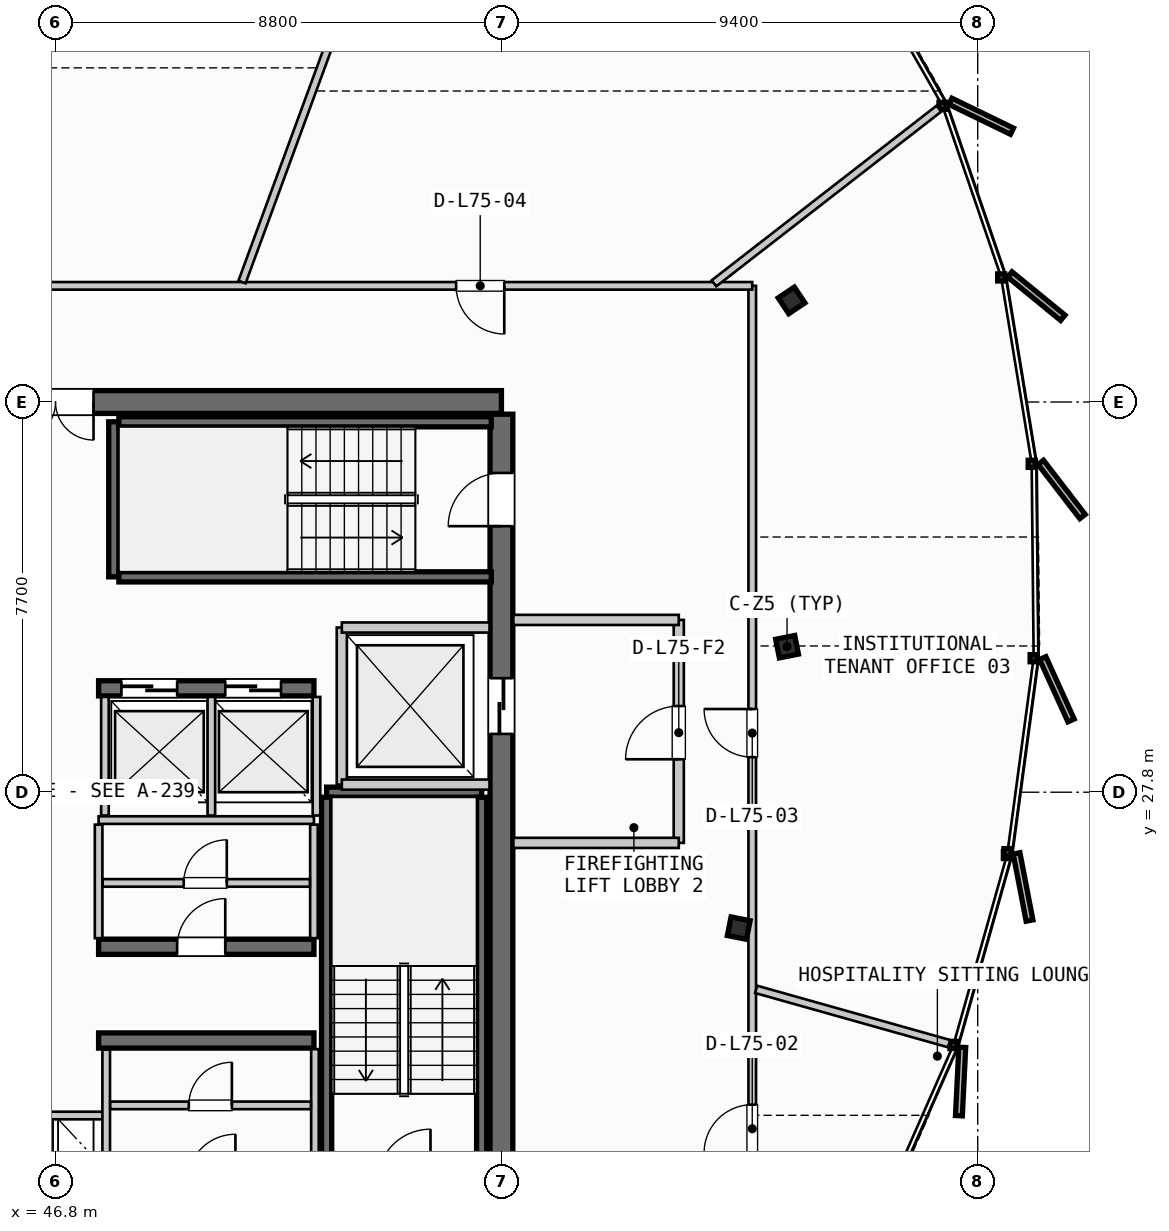
"""IFC4 building model, lengths in metres.
Left out: names, types, materials, properties, quantities, classifications, styles, units other than length and angle.
Written with IfcOpenShell. Run it as: python <this file> out.ifc"""

import sys

from ifc_helpers import new_model, si_unit, direction, frame, frame_2d, origin, origin_2d, place, context, subcontext, project, spatial, rectangle, i_section, extrude, source, transform, mapped, element, fill, save


model = new_model("IFC4")
c1 = context("Model", 3, precision=1e-05, world=origin(), true_north=direction((0.0, 1.0)))
c2 = subcontext(c1, "Body", "Model", "MODEL_VIEW")
j1 = project(units=[si_unit("LENGTHUNIT", "METRE"), si_unit("PLANEANGLEUNIT", "RADIAN")], contexts=[c1])
p1 = place(None, origin())
s1 = spatial("IfcSite", under=j1, at=p1, CompositionType="ELEMENT")
p2 = place(p1, origin())
s2 = spatial("IfcBuilding", under=s1, at=p2, CompositionType="ELEMENT")
p3 = place(p2, frame((0.0, 0.0, 283.6)))
s3 = spatial("IfcBuildingStorey", under=s2, at=p3, CompositionType="ELEMENT", Elevation=283.6)
p4 = place(p3, frame((55.6, 35.5, 0.0), z_axis=(0.0, 0.0, 1.0), x_axis=(-1.0, 0.0, 0.0)))
e1 = element("IfcWall", 1, at=p4, inside=s3, PredefinedType="SHEAR", context=c2, shape_type="SweptSolid", body=[
    extrude(rectangle(XDim=17.6, YDim=0.45, at=frame_2d((8.8, 0.0))), origin(), (0.0, 0.0, 1.0), 3.21),
])
p5 = place(p4, frame((8.05, 0.0, 0.0)))
e2 = element("IfcOpeningElement", 2, at=p5, cuts=e1, PredefinedType="OPENING", context=c2, shape_type="SweptSolid", body=[
    extrude(rectangle(XDim=1.5, YDim=2.2, at=frame_2d((0.75, 1.1))), frame((0.0, 0.235, 0.0), z_axis=(0.0, -1.0, 0.0), x_axis=(1.0, 0.0, 0.0)), (0.0, 0.0, 1.0), 0.47),
])
p6 = place(p4, frame((15.1, 0.0, 0.0)))
e3 = element("IfcOpeningElement", 3, at=p6, cuts=e1, PredefinedType="OPENING", context=c2, shape_type="SweptSolid", body=[
    extrude(rectangle(XDim=0.95, YDim=2.15, at=frame_2d((0.475, 1.075))), frame((0.0, 0.235, 0.0), z_axis=(0.0, -1.0, 0.0), x_axis=(1.0, 0.0, 0.0)), (0.0, 0.0, 1.0), 0.47),
])
p7 = place(p4, frame((12.9, 0.0, 0.0)))
e4 = element("IfcOpeningElement", 4, at=p7, cuts=e1, PredefinedType="OPENING", context=c2, shape_type="SweptSolid", body=[
    extrude(rectangle(XDim=0.9, YDim=2.15, at=frame_2d((0.45, 1.075))), frame((0.0, 0.235, 0.0), z_axis=(0.0, -1.0, 0.0), x_axis=(1.0, 0.0, 0.0)), (0.0, 0.0, 1.0), 0.47),
])
p8 = place(p4, frame((10.6, 0.0, 0.0)))
e5 = element("IfcOpeningElement", 5, at=p8, cuts=e1, PredefinedType="OPENING", context=c2, shape_type="SweptSolid", body=[
    extrude(rectangle(XDim=0.95, YDim=2.15, at=frame_2d((0.475, 1.075))), frame((0.0, 0.235, 0.0), z_axis=(0.0, -1.0, 0.0), x_axis=(1.0, 0.0, 0.0)), (0.0, 0.0, 1.0), 0.47),
])
p9 = place(p3, frame((55.6, 20.34, 0.0), z_axis=(0.0, 0.0, 1.0), x_axis=(0.0, 1.0, 0.0)))
e6 = element("IfcWall", 6, at=p9, inside=s3, PredefinedType="SHEAR", context=c2, shape_type="SweptSolid", body=[
    extrude(rectangle(XDim=14.92, YDim=0.45, at=frame_2d((7.46, 0.0))), origin(), (0.0, 0.0, 1.0), 3.21),
])
p10 = place(p9, frame((12.71, 0.0, 0.0)))
e7 = element("IfcOpeningElement", 7, at=p10, cuts=e6, PredefinedType="OPENING", context=c2, shape_type="SweptSolid", body=[
    extrude(rectangle(XDim=1.05, YDim=2.15, at=frame_2d((0.525, 1.075))), frame((0.0, 0.235, 0.0), z_axis=(0.0, -1.0, 0.0), x_axis=(1.0, 0.0, 0.0)), (0.0, 0.0, 1.0), 0.47),
])
p11 = place(p9, frame((8.61, 0.0, 0.0)))
e8 = element("IfcOpeningElement", 8, at=p11, cuts=e6, PredefinedType="OPENING", context=c2, shape_type="SweptSolid", body=[
    extrude(rectangle(XDim=1.1, YDim=2.2, at=frame_2d((0.55, 1.1))), frame((0.0, 0.235, 0.0), z_axis=(0.0, -1.0, 0.0), x_axis=(1.0, 0.0, 0.0)), (0.0, 0.0, 1.0), 0.47),
])
p12 = place(p3, frame((47.65, 22.9, 0.0), z_axis=(0.0, 0.0, 1.0), x_axis=(1.0, 0.0, 0.0)))
e9 = element("IfcWall", 9, at=p12, inside=s3, PredefinedType="SHEAR", context=c2, shape_type="SweptSolid", body=[
    extrude(rectangle(XDim=4.25, YDim=0.3, at=frame_2d((2.125, 0.0))), origin(), (0.0, 0.0, 1.0), 3.21),
])
p13 = place(p3, frame((47.65, 24.75, 0.0), z_axis=(0.0, 0.0, 1.0), x_axis=(1.0, 0.0, 0.0)))
e10 = element("IfcWall", 10, at=p13, inside=s3, PredefinedType="SHEAR", context=c2, shape_type="SweptSolid", body=[
    extrude(rectangle(XDim=4.25, YDim=0.3, at=frame_2d((2.125, 0.0))), origin(), (0.0, 0.0, 1.0), 3.21),
])
p14 = place(p13, frame((1.55, 0.0, 0.0)))
e11 = element("IfcOpeningElement", 11, at=p14, cuts=e10, PredefinedType="OPENING", context=c2, shape_type="SweptSolid", body=[
    extrude(rectangle(XDim=0.95, YDim=2.15, at=frame_2d((0.475, 1.075))), frame((0.0, 0.16, 0.0), z_axis=(0.0, -1.0, 0.0), x_axis=(1.0, 0.0, 0.0)), (0.0, 0.0, 1.0), 0.32),
])
p15 = place(p3, frame((47.65, 29.85, 0.0), z_axis=(0.0, 0.0, 1.0), x_axis=(1.0, 0.0, 0.0)))
e12 = element("IfcWall", 12, at=p15, inside=s3, PredefinedType="SHEAR", context=c2, shape_type="SweptSolid", body=[
    extrude(rectangle(XDim=4.25, YDim=0.3, at=frame_2d((2.125, 0.0))), origin(), (0.0, 0.0, 1.0), 3.21),
])
p16 = place(p15, frame((0.45, 0.0, 0.0)))
e13 = element("IfcOpeningElement", 13, at=p16, cuts=e12, PredefinedType="OPENING", context=c2, shape_type="SweptSolid", body=[
    extrude(rectangle(XDim=1.1, YDim=2.2, at=frame_2d((0.55, 1.1))), frame((0.0, 0.16, 0.0), z_axis=(0.0, -1.0, 0.0), x_axis=(1.0, 0.0, 0.0)), (0.0, 0.0, 1.0), 0.32),
])
p17 = place(p15, frame((2.5, 0.0, 0.0)))
e14 = element("IfcOpeningElement", 14, at=p17, cuts=e12, PredefinedType="OPENING", context=c2, shape_type="SweptSolid", body=[
    extrude(rectangle(XDim=1.1, YDim=2.2, at=frame_2d((0.55, 1.1))), frame((0.0, 0.16, 0.0), z_axis=(0.0, -1.0, 0.0), x_axis=(1.0, 0.0, 0.0)), (0.0, 0.0, 1.0), 0.32),
])
m1 = source(origin(), c2, "Body", "SweptSolid", [
    extrude(i_section(OverallWidth=0.374, OverallDepth=0.383, WebThickness=0.017, FlangeThickness=0.026, FilletRadius=0.015, at=origin_2d()), origin(), (0.0, 0.0, 1.0), 3.21),
])
for number, where, z_axis, x_axis in (
    (15, (61.237, 30.672, 0.0), (0.0, 0.0, 1.0), (0.981, 0.195, 0.0)),
    (16, (61.326, 37.506, 0.0), (0.0, 0.0, 1.0), (0.831, 0.556, 0.0)),
    (17, (60.284, 25.118, 0.0), (0.0, 0.0, 1.0), (0.981, -0.195, 0.0)),
):
    element("IfcColumn", number, at=place(p3, frame(where, z_axis=z_axis, x_axis=x_axis)), inside=s3, PredefinedType="COLUMN", context=c2, shape_type="MappedRepresentation", body=[
        mapped(m1, transform((0.0, 0.0, 0.0), scale=1.0)),
    ])
p18 = place(p3, frame((52.15, 27.8, 0.0), z_axis=(0.0, 0.0, 1.0), x_axis=(1.0, 0.0, 0.0)))
e18 = element("IfcWall", 18, at=p18, inside=s3, PredefinedType="SHEAR", context=c2, shape_type="SweptSolid", body=[
    extrude(rectangle(XDim=3.06, YDim=0.2, at=frame_2d((1.53, 0.0))), origin(), (0.0, 0.0, 1.0), 3.21),
])
for number, where, z_axis, x_axis in (
    (19, (55.21, 27.7, 0.0), (0.0, 0.0, 1.0), (0.0, -1.0, 0.0)),
    (20, (52.15, 20.35, 0.0), (0.0, 0.0, 1.0), (0.0, 1.0, 0.0)),
):
    element("IfcWall", number, at=place(p3, frame(where, z_axis=z_axis, x_axis=x_axis)), inside=s3, PredefinedType="SHEAR", context=c2, shape_type="SweptSolid", body=[
        extrude(rectangle(XDim=7.35, YDim=0.2, at=frame_2d((3.675, 0.0))), origin(), (0.0, 0.0, 1.0), 3.21),
    ])
p19 = place(p3, frame((47.95, 32.05, 0.0), z_axis=(0.0, 0.0, 1.0), x_axis=(0.0, 1.0, 0.0)))
e21 = element("IfcWall", 21, at=p19, inside=s3, PredefinedType="SHEAR", context=c2, shape_type="SweptSolid", body=[
    extrude(rectangle(XDim=3.06, YDim=0.2, at=frame_2d((1.53, 0.0))), origin(), (0.0, 0.0, 1.0), 3.21),
])
for number, where, z_axis, x_axis in (
    (22, (48.05, 35.11, 0.0), (0.0, 0.0, 1.0), (1.0, 0.0, 0.0)),
    (23, (55.4, 32.05, 0.0), (0.0, 0.0, 1.0), (-1.0, 0.0, 0.0)),
):
    element("IfcWall", number, at=place(p3, frame(where, z_axis=z_axis, x_axis=x_axis)), inside=s3, PredefinedType="SHEAR", context=c2, shape_type="SweptSolid", body=[
        extrude(rectangle(XDim=7.35, YDim=0.2, at=frame_2d((3.675, 0.0))), origin(), (0.0, 0.0, 1.0), 3.21),
    ])
p20 = place(p3, frame((45.8, 21.42, 0.0), z_axis=(0.0, 0.0, 1.0), x_axis=(1.0, 0.0, 0.0)))
e24 = element("IfcWall", 24, at=p20, inside=s3, PredefinedType="PARTITIONING", context=c2, shape_type="SweptSolid", body=[
    extrude(rectangle(XDim=2.0, YDim=0.15, at=frame_2d((1.0, 0.0))), origin(), (0.0, 0.0, 1.0), 2.455),
])
p21 = place(p3, frame((47.8, 20.48, 0.0), z_axis=(0.0, 0.0, 1.0), x_axis=(0.0, 1.0, 0.0)))
e25 = element("IfcWall", 25, at=p21, inside=s3, PredefinedType="PARTITIONING", context=c2, shape_type="SweptSolid", body=[
    extrude(rectangle(XDim=2.24, YDim=0.15, at=frame_2d((1.12, 0.0))), origin(), (0.0, 0.0, 1.0), 2.455),
])
p22 = place(p3, frame((52.45, 27.95, 0.0), z_axis=(0.0, 0.0, 1.0), x_axis=(0.0, 1.0, 0.0)))
e26 = element("IfcWall", 26, at=p22, inside=s3, PredefinedType="PARTITIONING", context=c2, shape_type="SweptSolid", body=[
    extrude(rectangle(XDim=3.1, YDim=0.2, at=frame_2d((1.55, 0.0))), origin(), (0.0, 0.0, 1.0), 2.455),
])
for number, where, z_axis, x_axis in (
    (27, (52.45, 27.95, 0.0), (0.0, 0.0, 1.0), (1.0, 0.0, 0.0)),
    (28, (52.45, 31.05, 0.0), (0.0, 0.0, 1.0), (1.0, 0.0, 0.0)),
):
    element("IfcWall", number, at=place(p3, frame(where, z_axis=z_axis, x_axis=x_axis)), inside=s3, PredefinedType="PARTITIONING", context=c2, shape_type="SweptSolid", body=[
        extrude(rectangle(XDim=2.915, YDim=0.2, at=frame_2d((1.458, 0.0))), origin(), (0.0, 0.0, 1.0), 2.455),
    ])
p23 = place(p3, frame((59.1, 26.8, 0.0), z_axis=(0.0, 0.0, 1.0), x_axis=(0.0, 1.0, 0.0)))
e29 = element("IfcWall", 29, at=p23, inside=s3, PredefinedType="PARTITIONING", context=c2, shape_type="SweptSolid", body=[
    extrude(rectangle(XDim=4.4, YDim=0.2, at=frame_2d((2.2, 0.0))), origin(), (0.0, 0.0, 1.0), 2.455),
])
p24 = place(p23, frame((1.65, 0.0, 0.0)))
e30 = element("IfcOpeningElement", 30, at=p24, cuts=e29, PredefinedType="OPENING", context=c2, shape_type="SweptSolid", body=[
    extrude(rectangle(XDim=1.05, YDim=2.15, at=frame_2d((0.525, 1.075))), frame((0.0, 0.11, 0.0), z_axis=(0.0, -1.0, 0.0), x_axis=(1.0, 0.0, 0.0)), (0.0, 0.0, 1.0), 0.22),
])
for number, where, z_axis, x_axis in (
    (31, (55.835, 26.8, 0.0), (0.0, 0.0, 1.0), (1.0, 0.0, 0.0)),
    (32, (55.835, 31.2, 0.0), (0.0, 0.0, 1.0), (1.0, 0.0, 0.0)),
):
    element("IfcWall", number, at=place(p3, frame(where, z_axis=z_axis, x_axis=x_axis)), inside=s3, PredefinedType="PARTITIONING", context=c2, shape_type="SweptSolid", body=[
        extrude(rectangle(XDim=3.265, YDim=0.2, at=frame_2d((1.633, 0.0))), origin(), (0.0, 0.0, 1.0), 2.455),
    ])
p25 = place(p3, frame((51.92, 20.335, 0.0), z_axis=(0.0, 0.0, 1.0), x_axis=(0.0, 1.0, 0.0)))
e33 = element("IfcWall", 33, at=p25, inside=s3, PredefinedType="PARTITIONING", context=c2, shape_type="SweptSolid", body=[
    extrude(rectangle(XDim=2.395, YDim=0.15, at=frame_2d((1.198, 0.0))), origin(), (0.0, 0.0, 1.0), 2.455),
])
p26 = place(p3, frame((47.88, 21.62, 0.0), z_axis=(0.0, 0.0, 1.0), x_axis=(1.0, 0.0, 0.0)))
e34 = element("IfcWall", 34, at=p26, inside=s3, PredefinedType="PARTITIONING", context=c2, shape_type="SweptSolid", body=[
    extrude(rectangle(XDim=3.96, YDim=0.15, at=frame_2d((1.98, 0.0))), origin(), (0.0, 0.0, 1.0), 2.455),
])
p27 = place(p26, frame((1.55, 0.0, 0.0)))
e35 = element("IfcOpeningElement", 35, at=p27, cuts=e34, PredefinedType="OPENING", context=c2, shape_type="SweptSolid", body=[
    extrude(rectangle(XDim=0.85, YDim=2.15, at=frame_2d((0.425, 1.075))), frame((0.0, 0.085, 0.0), z_axis=(0.0, -1.0, 0.0), x_axis=(1.0, 0.0, 0.0)), (0.0, 0.0, 1.0), 0.17),
])
p28 = place(p3, frame((47.65, 27.25, 0.0), z_axis=(0.0, 0.0, 1.0), x_axis=(1.0, 0.0, 0.0)))
e36 = element("IfcWall", 36, at=p28, inside=s3, PredefinedType="PARTITIONING", context=c2, shape_type="SweptSolid", body=[
    extrude(rectangle(XDim=4.25, YDim=0.15, at=frame_2d((2.125, 0.0))), origin(), (0.0, 0.0, 1.0), 2.455),
])
for number, where, z_axis, x_axis in (
    (37, (47.65, 24.92, 0.0), (0.0, 0.0, 1.0), (0.0, 1.0, 0.0)),
    (38, (51.9, 24.92, 0.0), (0.0, 0.0, 1.0), (0.0, 1.0, 0.0)),
):
    element("IfcWall", number, at=place(p3, frame(where, z_axis=z_axis, x_axis=x_axis)), inside=s3, PredefinedType="PARTITIONING", context=c2, shape_type="SweptSolid", body=[
        extrude(rectangle(XDim=2.24, YDim=0.15, at=frame_2d((1.12, 0.0))), origin(), (0.0, 0.0, 1.0), 2.455),
    ])
p29 = place(p3, frame((47.73, 26.01, 0.0), z_axis=(0.0, 0.0, 1.0), x_axis=(1.0, 0.0, 0.0)))
e39 = element("IfcWall", 39, at=p29, inside=s3, PredefinedType="PARTITIONING", context=c2, shape_type="SweptSolid", body=[
    extrude(rectangle(XDim=4.09, YDim=0.15, at=frame_2d((2.045, 0.0))), origin(), (0.0, 0.0, 1.0), 2.455),
])
p30 = place(p29, frame((1.6, 0.0, 0.0)))
e40 = element("IfcOpeningElement", 40, at=p30, cuts=e39, PredefinedType="OPENING", context=c2, shape_type="SweptSolid", body=[
    extrude(rectangle(XDim=0.85, YDim=2.15, at=frame_2d((0.425, 1.075))), frame((0.0, 0.085, 0.0), z_axis=(0.0, -1.0, 0.0), x_axis=(1.0, 0.0, 0.0)), (0.0, 0.0, 1.0), 0.17),
])
for number, where, z_axis, x_axis in (
    (41, (47.775, 27.34, 0.0), (0.0, 0.0, 1.0), (0.0, 1.0, 0.0)),
    (42, (49.875, 27.34, 0.0), (0.0, 0.0, 1.0), (0.0, 1.0, 0.0)),
    (43, (51.95, 27.34, 0.0), (0.0, 0.0, 1.0), (0.0, 1.0, 0.0)),
):
    element("IfcWall", number, at=place(p3, frame(where, z_axis=z_axis, x_axis=x_axis)), inside=s3, PredefinedType="PARTITIONING", context=c2, shape_type="SweptSolid", body=[
        extrude(rectangle(XDim=2.34, YDim=0.15, at=frame_2d((1.17, 0.0))), origin(), (0.0, 0.0, 1.0), 2.455),
    ])
p31 = place(p3, frame((60.55, 17.807, 0.0), z_axis=(0.0, 0.0, 1.0), x_axis=(0.0, 1.0, 0.0)))
e44 = element("IfcWall", 44, at=p31, inside=s3, PredefinedType="PARTITIONING", context=c2, shape_type="SweptSolid", body=[
    extrude(rectangle(XDim=19.986, YDim=0.15, at=frame_2d((9.993, 0.0))), origin(), (0.0, 0.0, 1.0), 2.455),
])
p32 = place(p31, frame((2.877, 0.0, 0.0)))
e45 = element("IfcOpeningElement", 45, at=p32, cuts=e44, PredefinedType="OPENING", context=c2, shape_type="SweptSolid", body=[
    extrude(rectangle(XDim=0.95, YDim=2.15, at=frame_2d((0.475, 1.075))), frame((0.0, 0.085, 0.0), z_axis=(0.0, -1.0, 0.0), x_axis=(1.0, 0.0, 0.0)), (0.0, 0.0, 1.0), 0.17),
])
p33 = place(p31, frame((10.685, 0.0, 0.0)))
e46 = element("IfcOpeningElement", 46, at=p33, cuts=e44, PredefinedType="OPENING", context=c2, shape_type="SweptSolid", body=[
    extrude(rectangle(XDim=0.95, YDim=2.15, at=frame_2d((0.475, 1.075))), frame((0.0, 0.085, 0.0), z_axis=(0.0, -1.0, 0.0), x_axis=(1.0, 0.0, 0.0)), (0.0, 0.0, 1.0), 0.17),
])
p34 = place(p3, frame((60.55, 37.793, 0.0), z_axis=(0.0, 0.0, 1.0), x_axis=(-1.0, 0.0, 0.0)))
e47 = element("IfcWall", 47, at=p34, inside=s3, PredefinedType="PARTITIONING", context=c2, shape_type="SweptSolid", body=[
    extrude(rectangle(XDim=28.87, YDim=0.15, at=frame_2d((14.435, 0.0))), origin(), (0.0, 0.0, 1.0), 2.455),
])
p35 = place(p34, frame((4.894, 0.0, 0.0)))
e48 = element("IfcOpeningElement", 48, at=p35, cuts=e47, PredefinedType="OPENING", context=c2, shape_type="SweptSolid", body=[
    extrude(rectangle(XDim=0.95, YDim=2.15, at=frame_2d((0.475, 1.075))), frame((0.0, 0.085, 0.0), z_axis=(0.0, -1.0, 0.0), x_axis=(1.0, 0.0, 0.0)), (0.0, 0.0, 1.0), 0.17),
])
p36 = place(p34, frame((18.71, 0.0, 0.0)))
e49 = element("IfcOpeningElement", 49, at=p36, cuts=e47, PredefinedType="OPENING", context=c2, shape_type="SweptSolid", body=[
    extrude(rectangle(XDim=0.95, YDim=2.15, at=frame_2d((0.475, 1.075))), frame((0.0, 0.085, 0.0), z_axis=(0.0, -1.0, 0.0), x_axis=(1.0, 0.0, 0.0)), (0.0, 0.0, 1.0), 0.17),
])
p37 = place(p3, frame((60.627, 23.909, 0.0), z_axis=(0.0, 0.0, 1.0), x_axis=(0.962613229875, -0.270879622102, 0.0)))
e50 = element("IfcWall", 50, at=p37, inside=s3, PredefinedType="PARTITIONING", context=c2, shape_type="SweptSolid", body=[
    extrude(rectangle(XDim=3.956, YDim=0.15, at=frame_2d((1.978, 0.0))), origin(), (0.0, 0.0, 1.0), 2.455),
])
p38 = place(p3, frame((59.795, 37.842, 0.0), z_axis=(0.0, 0.0, 1.0), x_axis=(0.789784727897, 0.613384124004, 0.0)))
e51 = element("IfcWall", 51, at=p38, inside=s3, PredefinedType="PARTITIONING", context=c2, shape_type="SweptSolid", body=[
    extrude(rectangle(XDim=5.62, YDim=0.15, at=frame_2d((2.81, 0.0))), origin(), (0.0, 0.0, 1.0), 2.455),
])
p39 = place(p3, frame((50.48, 37.868, 0.0), z_axis=(0.0, 0.0, 1.0), x_axis=(0.344902908423, 0.93863836687, 0.0)))
e52 = element("IfcWall", 52, at=p39, inside=s3, PredefinedType="PARTITIONING", context=c2, shape_type="SweptSolid", body=[
    extrude(rectangle(XDim=12.536, YDim=0.15, at=frame_2d((6.268, 0.0))), origin(), (0.0, 0.0, 1.0), 2.455),
])
m2 = source(origin(), c2, "Body", "SweptSolid", [
    extrude(rectangle(XDim=1.05, YDim=2.15, at=frame_2d((0.525, 1.075))), frame((0.0, 0.025, 0.0), z_axis=(0.0, -1.0, 0.0), x_axis=(1.0, 0.0, 0.0)), (0.0, 0.0, 1.0), 0.05),
])
p40 = place(p10, origin())
e53 = element("IfcDoor", 53, at=p40, inside=s3, OperationType="SINGLE_SWING_LEFT", PredefinedType="DOOR", context=c2, shape_type="MappedRepresentation", body=[
    mapped(m2, transform((0.0, 0.0, 0.0), scale=1.0)),
])
fill(e7, e53)
m3 = source(origin(), c2, "Body", "SweptSolid", [
    extrude(rectangle(XDim=1.5, YDim=2.2, at=frame_2d((0.75, 1.1))), frame((0.0, 0.025, 0.0), z_axis=(0.0, -1.0, 0.0), x_axis=(1.0, 0.0, 0.0)), (0.0, 0.0, 1.0), 0.05),
])
p41 = place(p5, origin())
e54 = element("IfcDoor", 54, at=p41, inside=s3, OperationType="DOUBLE_DOOR_SINGLE_SWING", PredefinedType="DOOR", context=c2, shape_type="MappedRepresentation", body=[
    mapped(m3, transform((0.0, 0.0, 0.0), scale=1.0)),
])
fill(e2, e54)
m4 = source(origin(), c2, "Body", "SweptSolid", [
    extrude(rectangle(XDim=1.1, YDim=2.2, at=frame_2d((0.55, 1.1))), frame((0.0, 0.025, 0.0), z_axis=(0.0, -1.0, 0.0), x_axis=(1.0, 0.0, 0.0)), (0.0, 0.0, 1.0), 0.05),
])
p42 = place(p11, origin())
e55 = element("IfcDoor", 55, at=p42, inside=s3, OperationType="SLIDING_TO_RIGHT", PredefinedType="DOOR", context=c2, shape_type="MappedRepresentation", body=[
    mapped(m4, transform((0.0, 0.0, 0.0), scale=1.0)),
])
fill(e8, e55)
m5 = source(origin(), c2, "Body", "SweptSolid", [
    extrude(rectangle(XDim=0.95, YDim=2.15, at=frame_2d((0.475, 1.075))), frame((0.0, 0.025, 0.0), z_axis=(0.0, -1.0, 0.0), x_axis=(1.0, 0.0, 0.0)), (0.0, 0.0, 1.0), 0.05),
])
p43 = place(p14, origin())
e56 = element("IfcDoor", 56, at=p43, inside=s3, OperationType="SINGLE_SWING_RIGHT", PredefinedType="DOOR", context=c2, shape_type="MappedRepresentation", body=[
    mapped(m5, transform((0.0, 0.0, 0.0), scale=1.0)),
])
fill(e11, e56)
p44 = place(p16, origin())
e57 = element("IfcDoor", 57, at=p44, inside=s3, OperationType="SLIDING_TO_LEFT", PredefinedType="DOOR", context=c2, shape_type="MappedRepresentation", body=[
    mapped(m4, transform((0.0, 0.0, 0.0), scale=1.0)),
])
fill(e13, e57)
p45 = place(p17, origin())
e58 = element("IfcDoor", 58, at=p45, inside=s3, OperationType="SLIDING_TO_LEFT", PredefinedType="DOOR", context=c2, shape_type="MappedRepresentation", body=[
    mapped(m4, transform((0.0, 0.0, 0.0), scale=1.0)),
])
fill(e14, e58)
p46 = place(p24, origin())
e59 = element("IfcDoor", 59, at=p46, inside=s3, OperationType="SINGLE_SWING_LEFT", PredefinedType="DOOR", context=c2, shape_type="MappedRepresentation", body=[
    mapped(m2, transform((0.0, 0.0, 0.0), scale=1.0)),
])
fill(e30, e59)
m6 = source(origin(), c2, "Body", "SweptSolid", [
    extrude(rectangle(XDim=0.85, YDim=2.15, at=frame_2d((0.425, 1.075))), frame((0.0, 0.025, 0.0), z_axis=(0.0, -1.0, 0.0), x_axis=(1.0, 0.0, 0.0)), (0.0, 0.0, 1.0), 0.05),
])
p47 = place(p27, origin())
e60 = element("IfcDoor", 60, at=p47, inside=s3, OperationType="SINGLE_SWING_RIGHT", PredefinedType="DOOR", context=c2, shape_type="MappedRepresentation", body=[
    mapped(m6, transform((0.0, 0.0, 0.0), scale=1.0)),
])
fill(e35, e60)
p48 = place(p30, origin())
e61 = element("IfcDoor", 61, at=p48, inside=s3, OperationType="SINGLE_SWING_RIGHT", PredefinedType="DOOR", context=c2, shape_type="MappedRepresentation", body=[
    mapped(m6, transform((0.0, 0.0, 0.0), scale=1.0)),
])
fill(e40, e61)
p49 = place(p32, origin())
e62 = element("IfcDoor", 62, at=p49, inside=s3, OperationType="SINGLE_SWING_LEFT", PredefinedType="DOOR", context=c2, shape_type="MappedRepresentation", body=[
    mapped(m5, transform((0.0, 0.0, 0.0), scale=1.0)),
])
fill(e45, e62)
p50 = place(p33, origin())
e63 = element("IfcDoor", 63, at=p50, inside=s3, OperationType="SINGLE_SWING_RIGHT", PredefinedType="DOOR", context=c2, shape_type="MappedRepresentation", body=[
    mapped(m5, transform((0.0, 0.0, 0.0), scale=1.0)),
])
fill(e46, e63)
p51 = place(p35, origin())
e64 = element("IfcDoor", 64, at=p51, inside=s3, OperationType="SINGLE_SWING_LEFT", PredefinedType="DOOR", context=c2, shape_type="MappedRepresentation", body=[
    mapped(m5, transform((0.0, 0.0, 0.0), scale=1.0)),
])
fill(e48, e64)
save(model, sys.argv[1])
